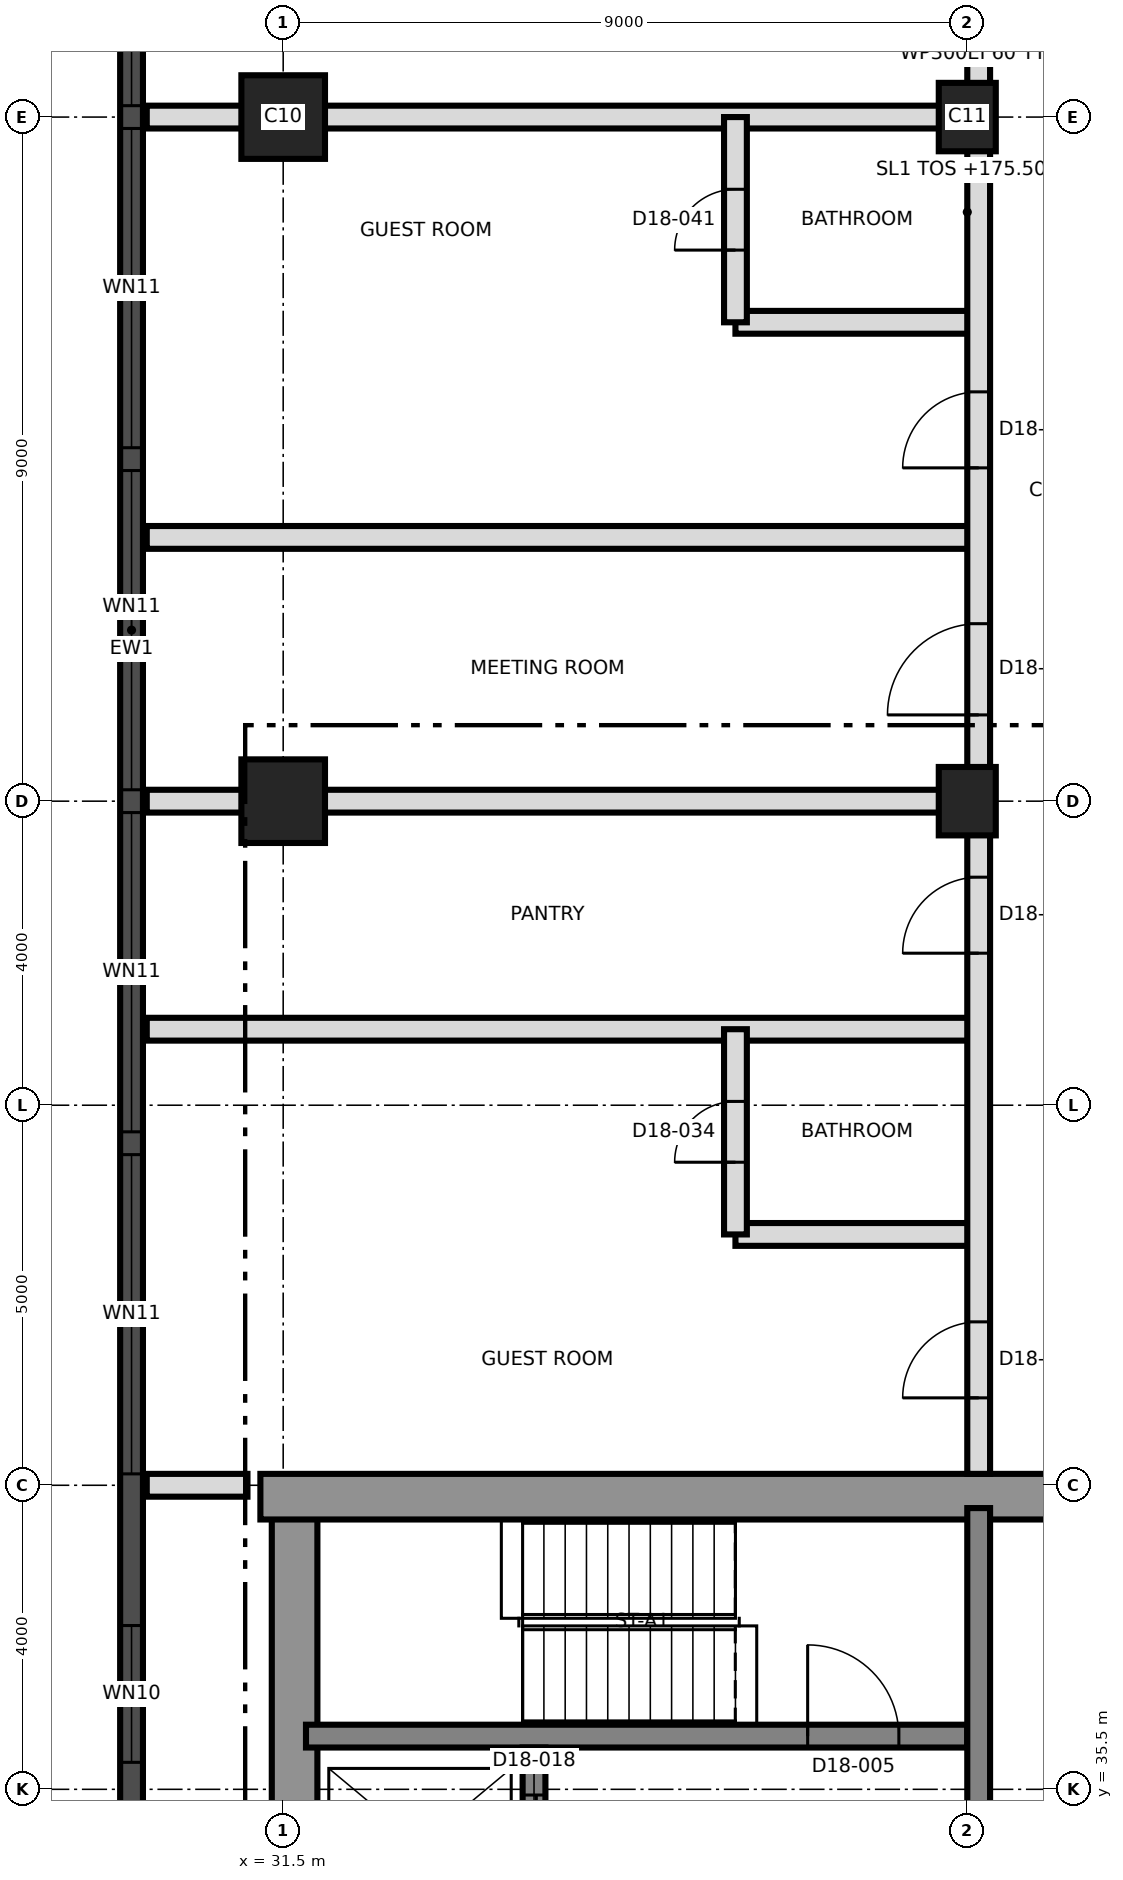
"""IFC4 building model, lengths in metres.
Left out: names, types, materials, properties, quantities, classifications, styles, units other than length and angle.
Written with IfcOpenShell. Run it as: python <this file> out.ifc"""

import sys

from ifc_helpers import new_model, si_unit, direction, frame, frame_2d, origin, origin_2d, place, context, subcontext, project, spatial, rectangle, extrude, element, fill, save


model = new_model("IFC4")
c1 = context("Model", 3, precision=1e-05, world=origin(), true_north=direction((0.0, 1.0)))
c2 = subcontext(c1, "Body", "Model", "MODEL_VIEW")
j1 = project(units=[si_unit("LENGTHUNIT", "METRE"), si_unit("PLANEANGLEUNIT", "RADIAN")], contexts=[c1])
p1 = place(None, origin())
s1 = spatial("IfcSite", under=j1, at=p1, CompositionType="ELEMENT")
p2 = place(p1, origin())
s2 = spatial("IfcBuilding", under=s1, at=p2, CompositionType="ELEMENT")
p3 = place(p2, frame((0.0, 0.0, 175.5)))
s3 = spatial("IfcBuildingStorey", under=s2, at=p3, CompositionType="ELEMENT", Elevation=175.5)
p4 = place(p3, frame((31.65, 21.8, 0.0), z_axis=(0.0, 0.0, 1.0), x_axis=(0.0, 1.0, 0.0)))
e1 = element("IfcWall", 1, at=p4, inside=s3, PredefinedType="SHEAR", context=c2, shape_type="SweptSolid", body=[
    extrude(rectangle(XDim=17.4, YDim=0.6, at=frame_2d((8.7, 0.0))), origin(), (0.0, 0.0, 1.0), 3.7),
])
p5 = place(p3, frame((31.2, 39.35, 0.0), z_axis=(0.0, 0.0, 1.0), x_axis=(1.0, 0.0, 0.0)))
e2 = element("IfcWall", 2, at=p5, inside=s3, PredefinedType="SHEAR", context=c2, shape_type="SweptSolid", body=[
    extrude(rectangle(XDim=27.0, YDim=0.6, at=frame_2d((13.5, 0.0))), origin(), (0.0, 0.0, 1.0), 3.7),
])
p6 = place(p5, frame((10.5, 0.0, 0.0)))
e3 = element("IfcOpeningElement", 3, at=p6, cuts=e2, PredefinedType="OPENING", context=c2, shape_type="SweptSolid", body=[
    extrude(rectangle(XDim=1.2, YDim=2.1, at=frame_2d((0.6, 1.05))), frame((0.0, 0.31, 0.0), z_axis=(0.0, -1.0, 0.0), x_axis=(1.0, 0.0, 0.0)), (0.0, 0.0, 1.0), 0.62),
])
p7 = place(p3, frame((31.8, 36.2, 0.0), z_axis=(0.0, 0.0, 1.0), x_axis=(1.0, 0.0, 0.0)))
e4 = element("IfcWall", 4, at=p7, inside=s3, PredefinedType="SHEAR", context=c2, shape_type="SweptSolid", body=[
    extrude(rectangle(XDim=8.7, YDim=0.3, at=frame_2d((4.35, 0.0))), origin(), (0.0, 0.0, 1.0), 3.7),
])
p8 = place(p7, frame((6.6, 0.0, 0.0)))
e5 = element("IfcOpeningElement", 5, at=p8, cuts=e4, PredefinedType="OPENING", context=c2, shape_type="SweptSolid", body=[
    extrude(rectangle(XDim=1.2, YDim=2.1, at=frame_2d((0.6, 1.05))), frame((0.0, 0.16, 0.0), z_axis=(0.0, -1.0, 0.0), x_axis=(1.0, 0.0, 0.0)), (0.0, 0.0, 1.0), 0.32),
])
p9 = place(p3, frame((40.65, 33.5, 0.0), z_axis=(0.0, 0.0, 1.0), x_axis=(0.0, 1.0, 0.0)))
e6 = element("IfcWall", 6, at=p9, inside=s3, PredefinedType="SHEAR", context=c2, shape_type="SweptSolid", body=[
    extrude(rectangle(XDim=5.7, YDim=0.3, at=frame_2d((2.85, 0.0))), origin(), (0.0, 0.0, 1.0), 3.7),
])
p10 = place(p3, frame((34.8, 33.5, 0.0), z_axis=(0.0, 0.0, 1.0), x_axis=(0.0, 1.0, 0.0)))
e7 = element("IfcWall", 7, at=p10, inside=s3, PredefinedType="SHEAR", context=c2, shape_type="SweptSolid", body=[
    extrude(rectangle(XDim=2.55, YDim=0.3, at=frame_2d((1.275, 0.0))), origin(), (0.0, 0.0, 1.0), 3.7),
])
p11 = place(p10, frame((0.625, 0.0, 0.0)))
e8 = element("IfcOpeningElement", 8, at=p11, cuts=e7, PredefinedType="OPENING", context=c2, shape_type="SweptSolid", body=[
    extrude(rectangle(XDim=1.3, YDim=2.4, at=frame_2d((0.65, 1.2))), frame((0.0, 0.16, 0.0), z_axis=(0.0, -1.0, 0.0), x_axis=(1.0, 0.0, 0.0)), (0.0, 0.0, 1.0), 0.32),
])
p12 = place(p3, frame((31.5, 48.5, 0.0), z_axis=(0.0, 0.0, 1.0), x_axis=(1.0, 0.0, 0.0)))
e9 = element("IfcColumn", 9, at=p12, inside=s3, PredefinedType="COLUMN", context=c2, shape_type="SweptSolid", body=[
    extrude(rectangle(XDim=1.1, YDim=1.1, at=origin_2d()), origin(), (0.0, 0.0, 1.0), 3.7),
])
p13 = place(p3, frame((40.5, 48.5, 0.0), z_axis=(0.0, 0.0, 1.0), x_axis=(0.0, 1.0, 0.0)))
e10 = element("IfcColumn", 10, at=p13, inside=s3, PredefinedType="COLUMN", context=c2, shape_type="SweptSolid", body=[
    extrude(rectangle(XDim=0.9, YDim=0.75, at=origin_2d()), origin(), (0.0, 0.0, 1.0), 3.7),
])
p14 = place(p3, frame((31.5, 57.5, 0.0), z_axis=(0.0, 0.0, 1.0), x_axis=(1.0, 0.0, 0.0)))
e11 = element("IfcColumn", 11, at=p14, inside=s3, PredefinedType="COLUMN", context=c2, shape_type="SweptSolid", body=[
    extrude(rectangle(XDim=1.1, YDim=1.1, at=origin_2d()), origin(), (0.0, 0.0, 1.0), 3.7),
])
p15 = place(p3, frame((40.5, 57.5, 0.0), z_axis=(0.0, 0.0, 1.0), x_axis=(0.0, 1.0, 0.0)))
e12 = element("IfcColumn", 12, at=p15, inside=s3, PredefinedType="COLUMN", context=c2, shape_type="SweptSolid", body=[
    extrude(rectangle(XDim=0.9, YDim=0.75, at=origin_2d()), origin(), (0.0, 0.0, 1.0), 3.7),
])
p16 = place(p3, frame((29.505, 66.986, 0.0), z_axis=(0.0, 0.0, 1.0), x_axis=(0.0, -1.0, 0.0)))
e13 = element("IfcWall", 13, at=p16, inside=s3, PredefinedType="SOLIDWALL", context=c2, shape_type="SweptSolid", body=[
    extrude(rectangle(XDim=32.976, YDim=0.3, at=frame_2d((16.488, 0.0))), origin(), (0.0, 0.0, 1.0), 3.4),
])
p17 = place(p16, frame((1.593, 0.0, 0.3)))
e14 = element("IfcOpeningElement", 14, at=p17, cuts=e13, PredefinedType="OPENING", context=c2, shape_type="SweptSolid", body=[
    extrude(rectangle(XDim=1.8, YDim=2.4, at=frame_2d((0.9, 1.2))), frame((0.0, 0.16, 0.0), z_axis=(0.0, -1.0, 0.0), x_axis=(1.0, 0.0, 0.0)), (0.0, 0.0, 1.0), 0.32),
])
p18 = place(p16, frame((5.136, 0.0, 0.9)))
e15 = element("IfcOpeningElement", 15, at=p18, cuts=e13, PredefinedType="OPENING", context=c2, shape_type="SweptSolid", body=[
    extrude(rectangle(XDim=4.2, YDim=1.5, at=frame_2d((2.1, 0.75))), frame((0.0, 0.16, 0.0), z_axis=(0.0, -1.0, 0.0), x_axis=(1.0, 0.0, 0.0)), (0.0, 0.0, 1.0), 0.32),
])
p19 = place(p16, frame((9.636, 0.0, 0.9)))
e16 = element("IfcOpeningElement", 16, at=p19, cuts=e13, PredefinedType="OPENING", context=c2, shape_type="SweptSolid", body=[
    extrude(rectangle(XDim=4.2, YDim=1.5, at=frame_2d((2.1, 0.75))), frame((0.0, 0.16, 0.0), z_axis=(0.0, -1.0, 0.0), x_axis=(1.0, 0.0, 0.0)), (0.0, 0.0, 1.0), 0.32),
])
p20 = place(p16, frame((14.136, 0.0, 0.9)))
e17 = element("IfcOpeningElement", 17, at=p20, cuts=e13, PredefinedType="OPENING", context=c2, shape_type="SweptSolid", body=[
    extrude(rectangle(XDim=4.2, YDim=1.5, at=frame_2d((2.1, 0.75))), frame((0.0, 0.16, 0.0), z_axis=(0.0, -1.0, 0.0), x_axis=(1.0, 0.0, 0.0)), (0.0, 0.0, 1.0), 0.32),
])
p21 = place(p16, frame((18.636, 0.0, 0.9)))
e18 = element("IfcOpeningElement", 18, at=p21, cuts=e13, PredefinedType="OPENING", context=c2, shape_type="SweptSolid", body=[
    extrude(rectangle(XDim=4.2, YDim=1.5, at=frame_2d((2.1, 0.75))), frame((0.0, 0.16, 0.0), z_axis=(0.0, -1.0, 0.0), x_axis=(1.0, 0.0, 0.0)), (0.0, 0.0, 1.0), 0.32),
])
p22 = place(p16, frame((23.136, 0.0, 0.9)))
e19 = element("IfcOpeningElement", 19, at=p22, cuts=e13, PredefinedType="OPENING", context=c2, shape_type="SweptSolid", body=[
    extrude(rectangle(XDim=4.2, YDim=1.5, at=frame_2d((2.1, 0.75))), frame((0.0, 0.16, 0.0), z_axis=(0.0, -1.0, 0.0), x_axis=(1.0, 0.0, 0.0)), (0.0, 0.0, 1.0), 0.32),
])
p23 = place(p16, frame((29.331, 0.0, 0.3)))
e20 = element("IfcOpeningElement", 20, at=p23, cuts=e13, PredefinedType="OPENING", context=c2, shape_type="SweptSolid", body=[
    extrude(rectangle(XDim=1.8, YDim=2.4, at=frame_2d((0.9, 1.2))), frame((0.0, 0.16, 0.0), z_axis=(0.0, -1.0, 0.0), x_axis=(1.0, 0.0, 0.0)), (0.0, 0.0, 1.0), 0.32),
])
p24 = place(p3, frame((29.705, 39.5, 0.0), z_axis=(0.0, 0.0, 1.0), x_axis=(1.0, 0.0, 0.0)))
e21 = element("IfcWall", 21, at=p24, inside=s3, PredefinedType="PARTITIONING", context=c2, shape_type="SweptSolid", body=[
    extrude(rectangle(XDim=1.325, YDim=0.3, at=frame_2d((0.663, 0.0))), origin(), (0.0, 0.0, 1.0), 3.4),
])
p25 = place(p3, frame((37.45, 42.8, 0.0), z_axis=(0.0, 0.0, 1.0), x_axis=(1.0, 0.0, 0.0)))
e22 = element("IfcWall", 22, at=p25, inside=s3, PredefinedType="PARTITIONING", context=c2, shape_type="SweptSolid", body=[
    extrude(rectangle(XDim=3.2, YDim=0.3, at=frame_2d((1.6, 0.0))), origin(), (0.0, 0.0, 1.0), 3.4),
])
for number, where, z_axis, x_axis in (
    (23, (29.705, 45.5, 0.0), (0.0, 0.0, 1.0), (1.0, 0.0, 0.0)),
    (24, (29.705, 48.5, 0.0), (0.0, 0.0, 1.0), (1.0, 0.0, 0.0)),
    (25, (29.705, 51.97, 0.0), (0.0, 0.0, 1.0), (1.0, 0.0, 0.0)),
):
    element("IfcWall", number, at=place(p3, frame(where, z_axis=z_axis, x_axis=x_axis)), inside=s3, PredefinedType="PARTITIONING", context=c2, shape_type="SweptSolid", body=[
        extrude(rectangle(XDim=10.945, YDim=0.3, at=frame_2d((5.472, 0.0))), origin(), (0.0, 0.0, 1.0), 3.4),
    ])
p26 = place(p3, frame((37.45, 54.8, 0.0), z_axis=(0.0, 0.0, 1.0), x_axis=(1.0, 0.0, 0.0)))
e26 = element("IfcWall", 26, at=p26, inside=s3, PredefinedType="PARTITIONING", context=c2, shape_type="SweptSolid", body=[
    extrude(rectangle(XDim=3.2, YDim=0.3, at=frame_2d((1.6, 0.0))), origin(), (0.0, 0.0, 1.0), 3.4),
])
p27 = place(p3, frame((29.705, 57.5, 0.0), z_axis=(0.0, 0.0, 1.0), x_axis=(1.0, 0.0, 0.0)))
e27 = element("IfcWall", 27, at=p27, inside=s3, PredefinedType="PARTITIONING", context=c2, shape_type="SweptSolid", body=[
    extrude(rectangle(XDim=10.945, YDim=0.3, at=frame_2d((5.472, 0.0))), origin(), (0.0, 0.0, 1.0), 3.4),
])
p28 = place(p3, frame((37.45, 42.8, 0.0), z_axis=(0.0, 0.0, 1.0), x_axis=(0.0, 1.0, 0.0)))
e28 = element("IfcWall", 28, at=p28, inside=s3, PredefinedType="PARTITIONING", context=c2, shape_type="SweptSolid", body=[
    extrude(rectangle(XDim=2.7, YDim=0.3, at=frame_2d((1.35, 0.0))), origin(), (0.0, 0.0, 1.0), 3.4),
])
p29 = place(p28, frame((0.95, 0.0, 0.0)))
e29 = element("IfcOpeningElement", 29, at=p29, cuts=e28, PredefinedType="OPENING", context=c2, shape_type="SweptSolid", body=[
    extrude(rectangle(XDim=0.8, YDim=2.1, at=frame_2d((0.4, 1.05))), frame((0.0, 0.16, 0.0), z_axis=(0.0, -1.0, 0.0), x_axis=(1.0, 0.0, 0.0)), (0.0, 0.0, 1.0), 0.32),
])
p30 = place(p3, frame((37.45, 54.8, 0.0), z_axis=(0.0, 0.0, 1.0), x_axis=(0.0, 1.0, 0.0)))
e30 = element("IfcWall", 30, at=p30, inside=s3, PredefinedType="PARTITIONING", context=c2, shape_type="SweptSolid", body=[
    extrude(rectangle(XDim=2.7, YDim=0.3, at=frame_2d((1.35, 0.0))), origin(), (0.0, 0.0, 1.0), 3.4),
])
p31 = place(p30, frame((0.95, 0.0, 0.0)))
e31 = element("IfcOpeningElement", 31, at=p31, cuts=e30, PredefinedType="OPENING", context=c2, shape_type="SweptSolid", body=[
    extrude(rectangle(XDim=0.8, YDim=2.1, at=frame_2d((0.4, 1.05))), frame((0.0, 0.16, 0.0), z_axis=(0.0, -1.0, 0.0), x_axis=(1.0, 0.0, 0.0)), (0.0, 0.0, 1.0), 0.32),
])
p32 = place(p3, frame((40.65, 39.65, 0.0), z_axis=(0.0, 0.0, 1.0), x_axis=(0.0, 1.0, 0.0)))
e32 = element("IfcWall", 32, at=p32, inside=s3, PredefinedType="PARTITIONING", context=c2, shape_type="SweptSolid", body=[
    extrude(rectangle(XDim=37.35, YDim=0.3, at=frame_2d((18.675, 0.0))), origin(), (0.0, 0.0, 1.0), 3.4),
])
p33 = place(p32, frame((1.0, 0.0, 0.0)))
e33 = element("IfcOpeningElement", 33, at=p33, cuts=e32, PredefinedType="OPENING", context=c2, shape_type="SweptSolid", body=[
    extrude(rectangle(XDim=1.0, YDim=2.1, at=frame_2d((0.5, 1.05))), frame((0.0, 0.16, 0.0), z_axis=(0.0, -1.0, 0.0), x_axis=(1.0, 0.0, 0.0)), (0.0, 0.0, 1.0), 0.32),
])
p34 = place(p32, frame((6.85, 0.0, 0.0)))
e34 = element("IfcOpeningElement", 34, at=p34, cuts=e32, PredefinedType="OPENING", context=c2, shape_type="SweptSolid", body=[
    extrude(rectangle(XDim=1.0, YDim=2.1, at=frame_2d((0.5, 1.05))), frame((0.0, 0.16, 0.0), z_axis=(0.0, -1.0, 0.0), x_axis=(1.0, 0.0, 0.0)), (0.0, 0.0, 1.0), 0.32),
])
p35 = place(p32, frame((9.985, 0.0, 0.0)))
e35 = element("IfcOpeningElement", 35, at=p35, cuts=e32, PredefinedType="OPENING", context=c2, shape_type="SweptSolid", body=[
    extrude(rectangle(XDim=1.2, YDim=2.1, at=frame_2d((0.6, 1.05))), frame((0.0, 0.16, 0.0), z_axis=(0.0, -1.0, 0.0), x_axis=(1.0, 0.0, 0.0)), (0.0, 0.0, 1.0), 0.32),
])
p36 = place(p32, frame((13.235, 0.0, 0.0)))
e36 = element("IfcOpeningElement", 36, at=p36, cuts=e32, PredefinedType="OPENING", context=c2, shape_type="SweptSolid", body=[
    extrude(rectangle(XDim=1.0, YDim=2.1, at=frame_2d((0.5, 1.05))), frame((0.0, 0.16, 0.0), z_axis=(0.0, -1.0, 0.0), x_axis=(1.0, 0.0, 0.0)), (0.0, 0.0, 1.0), 0.32),
])
p37 = place(p32, frame((21.35, 0.0, 0.0)))
e37 = element("IfcOpeningElement", 37, at=p37, cuts=e32, PredefinedType="OPENING", context=c2, shape_type="SweptSolid", body=[
    extrude(rectangle(XDim=1.0, YDim=2.4, at=frame_2d((0.5, 1.2))), frame((0.0, 0.16, 0.0), z_axis=(0.0, -1.0, 0.0), x_axis=(1.0, 0.0, 0.0)), (0.0, 0.0, 1.0), 0.32),
])
p38 = place(p18, origin())
e38 = element("IfcWindow", 38, at=p38, inside=s3, PartitioningType="SINGLE_PANEL", PredefinedType="WINDOW", context=c2, shape_type="SweptSolid", body=[
    extrude(rectangle(XDim=4.2, YDim=1.5, at=frame_2d((2.1, 0.75))), frame((0.0, 0.03, 0.0), z_axis=(0.0, -1.0, 0.0), x_axis=(1.0, 0.0, 0.0)), (0.0, 0.0, 1.0), 0.06),
])
fill(e15, e38)
p39 = place(p19, origin())
e39 = element("IfcWindow", 39, at=p39, inside=s3, PartitioningType="SINGLE_PANEL", PredefinedType="WINDOW", context=c2, shape_type="SweptSolid", body=[
    extrude(rectangle(XDim=4.2, YDim=1.5, at=frame_2d((2.1, 0.75))), frame((0.0, 0.03, 0.0), z_axis=(0.0, -1.0, 0.0), x_axis=(1.0, 0.0, 0.0)), (0.0, 0.0, 1.0), 0.06),
])
fill(e16, e39)
p40 = place(p20, origin())
e40 = element("IfcWindow", 40, at=p40, inside=s3, PartitioningType="SINGLE_PANEL", PredefinedType="WINDOW", context=c2, shape_type="SweptSolid", body=[
    extrude(rectangle(XDim=4.2, YDim=1.5, at=frame_2d((2.1, 0.75))), frame((0.0, 0.03, 0.0), z_axis=(0.0, -1.0, 0.0), x_axis=(1.0, 0.0, 0.0)), (0.0, 0.0, 1.0), 0.06),
])
fill(e17, e40)
p41 = place(p21, origin())
e41 = element("IfcWindow", 41, at=p41, inside=s3, PartitioningType="SINGLE_PANEL", PredefinedType="WINDOW", context=c2, shape_type="SweptSolid", body=[
    extrude(rectangle(XDim=4.2, YDim=1.5, at=frame_2d((2.1, 0.75))), frame((0.0, 0.03, 0.0), z_axis=(0.0, -1.0, 0.0), x_axis=(1.0, 0.0, 0.0)), (0.0, 0.0, 1.0), 0.06),
])
fill(e18, e41)
p42 = place(p22, origin())
e42 = element("IfcWindow", 42, at=p42, inside=s3, PartitioningType="SINGLE_PANEL", PredefinedType="WINDOW", context=c2, shape_type="SweptSolid", body=[
    extrude(rectangle(XDim=4.2, YDim=1.5, at=frame_2d((2.1, 0.75))), frame((0.0, 0.03, 0.0), z_axis=(0.0, -1.0, 0.0), x_axis=(1.0, 0.0, 0.0)), (0.0, 0.0, 1.0), 0.06),
])
fill(e19, e42)
p43 = place(p23, origin())
e43 = element("IfcWindow", 43, at=p43, inside=s3, PartitioningType="SINGLE_PANEL", PredefinedType="WINDOW", context=c2, shape_type="SweptSolid", body=[
    extrude(rectangle(XDim=1.8, YDim=2.4, at=frame_2d((0.9, 1.2))), frame((0.0, 0.03, 0.0), z_axis=(0.0, -1.0, 0.0), x_axis=(1.0, 0.0, 0.0)), (0.0, 0.0, 1.0), 0.06),
])
fill(e20, e43)
p44 = place(p8, origin())
e44 = element("IfcDoor", 44, at=p44, inside=s3, OperationType="SINGLE_SWING_RIGHT", PredefinedType="DOOR", context=c2, shape_type="SweptSolid", body=[
    extrude(rectangle(XDim=1.2, YDim=2.1, at=frame_2d((0.6, 1.05))), frame((0.0, 0.025, 0.0), z_axis=(0.0, -1.0, 0.0), x_axis=(1.0, 0.0, 0.0)), (0.0, 0.0, 1.0), 0.05),
])
fill(e5, e44)
p45 = place(p11, origin())
e45 = element("IfcDoor", 45, at=p45, inside=s3, OperationType="SLIDING_TO_LEFT", PredefinedType="DOOR", context=c2, shape_type="SweptSolid", body=[
    extrude(rectangle(XDim=1.3, YDim=2.4, at=frame_2d((0.65, 1.2))), frame((0.0, 0.025, 0.0), z_axis=(0.0, -1.0, 0.0), x_axis=(1.0, 0.0, 0.0)), (0.0, 0.0, 1.0), 0.05),
])
fill(e8, e45)
p46 = place(p29, origin())
e46 = element("IfcDoor", 46, at=p46, inside=s3, OperationType="SINGLE_SWING_RIGHT", PredefinedType="DOOR", context=c2, shape_type="SweptSolid", body=[
    extrude(rectangle(XDim=0.8, YDim=2.1, at=frame_2d((0.4, 1.05))), frame((0.0, 0.025, 0.0), z_axis=(0.0, -1.0, 0.0), x_axis=(1.0, 0.0, 0.0)), (0.0, 0.0, 1.0), 0.05),
])
fill(e29, e46)
p47 = place(p33, origin())
e47 = element("IfcDoor", 47, at=p47, inside=s3, OperationType="SINGLE_SWING_LEFT", PredefinedType="DOOR", context=c2, shape_type="SweptSolid", body=[
    extrude(rectangle(XDim=1.0, YDim=2.1, at=frame_2d((0.5, 1.05))), frame((0.0, 0.025, 0.0), z_axis=(0.0, -1.0, 0.0), x_axis=(1.0, 0.0, 0.0)), (0.0, 0.0, 1.0), 0.05),
])
fill(e33, e47)
p48 = place(p34, origin())
e48 = element("IfcDoor", 48, at=p48, inside=s3, OperationType="SINGLE_SWING_LEFT", PredefinedType="DOOR", context=c2, shape_type="SweptSolid", body=[
    extrude(rectangle(XDim=1.0, YDim=2.1, at=frame_2d((0.5, 1.05))), frame((0.0, 0.025, 0.0), z_axis=(0.0, -1.0, 0.0), x_axis=(1.0, 0.0, 0.0)), (0.0, 0.0, 1.0), 0.05),
])
fill(e34, e48)
p49 = place(p35, origin())
e49 = element("IfcDoor", 49, at=p49, inside=s3, OperationType="SINGLE_SWING_LEFT", PredefinedType="DOOR", context=c2, shape_type="SweptSolid", body=[
    extrude(rectangle(XDim=1.2, YDim=2.1, at=frame_2d((0.6, 1.05))), frame((0.0, 0.025, 0.0), z_axis=(0.0, -1.0, 0.0), x_axis=(1.0, 0.0, 0.0)), (0.0, 0.0, 1.0), 0.05),
])
fill(e35, e49)
p50 = place(p31, origin())
e50 = element("IfcDoor", 50, at=p50, inside=s3, OperationType="SINGLE_SWING_LEFT", PredefinedType="DOOR", context=c2, shape_type="SweptSolid", body=[
    extrude(rectangle(XDim=0.8, YDim=2.1, at=frame_2d((0.4, 1.05))), frame((0.0, 0.025, 0.0), z_axis=(0.0, -1.0, 0.0), x_axis=(1.0, 0.0, 0.0)), (0.0, 0.0, 1.0), 0.05),
])
fill(e31, e50)
p51 = place(p36, origin())
e51 = element("IfcDoor", 51, at=p51, inside=s3, OperationType="SINGLE_SWING_RIGHT", PredefinedType="DOOR", context=c2, shape_type="SweptSolid", body=[
    extrude(rectangle(XDim=1.0, YDim=2.1, at=frame_2d((0.5, 1.05))), frame((0.0, 0.025, 0.0), z_axis=(0.0, -1.0, 0.0), x_axis=(1.0, 0.0, 0.0)), (0.0, 0.0, 1.0), 0.05),
])
fill(e36, e51)
save(model, sys.argv[1])
